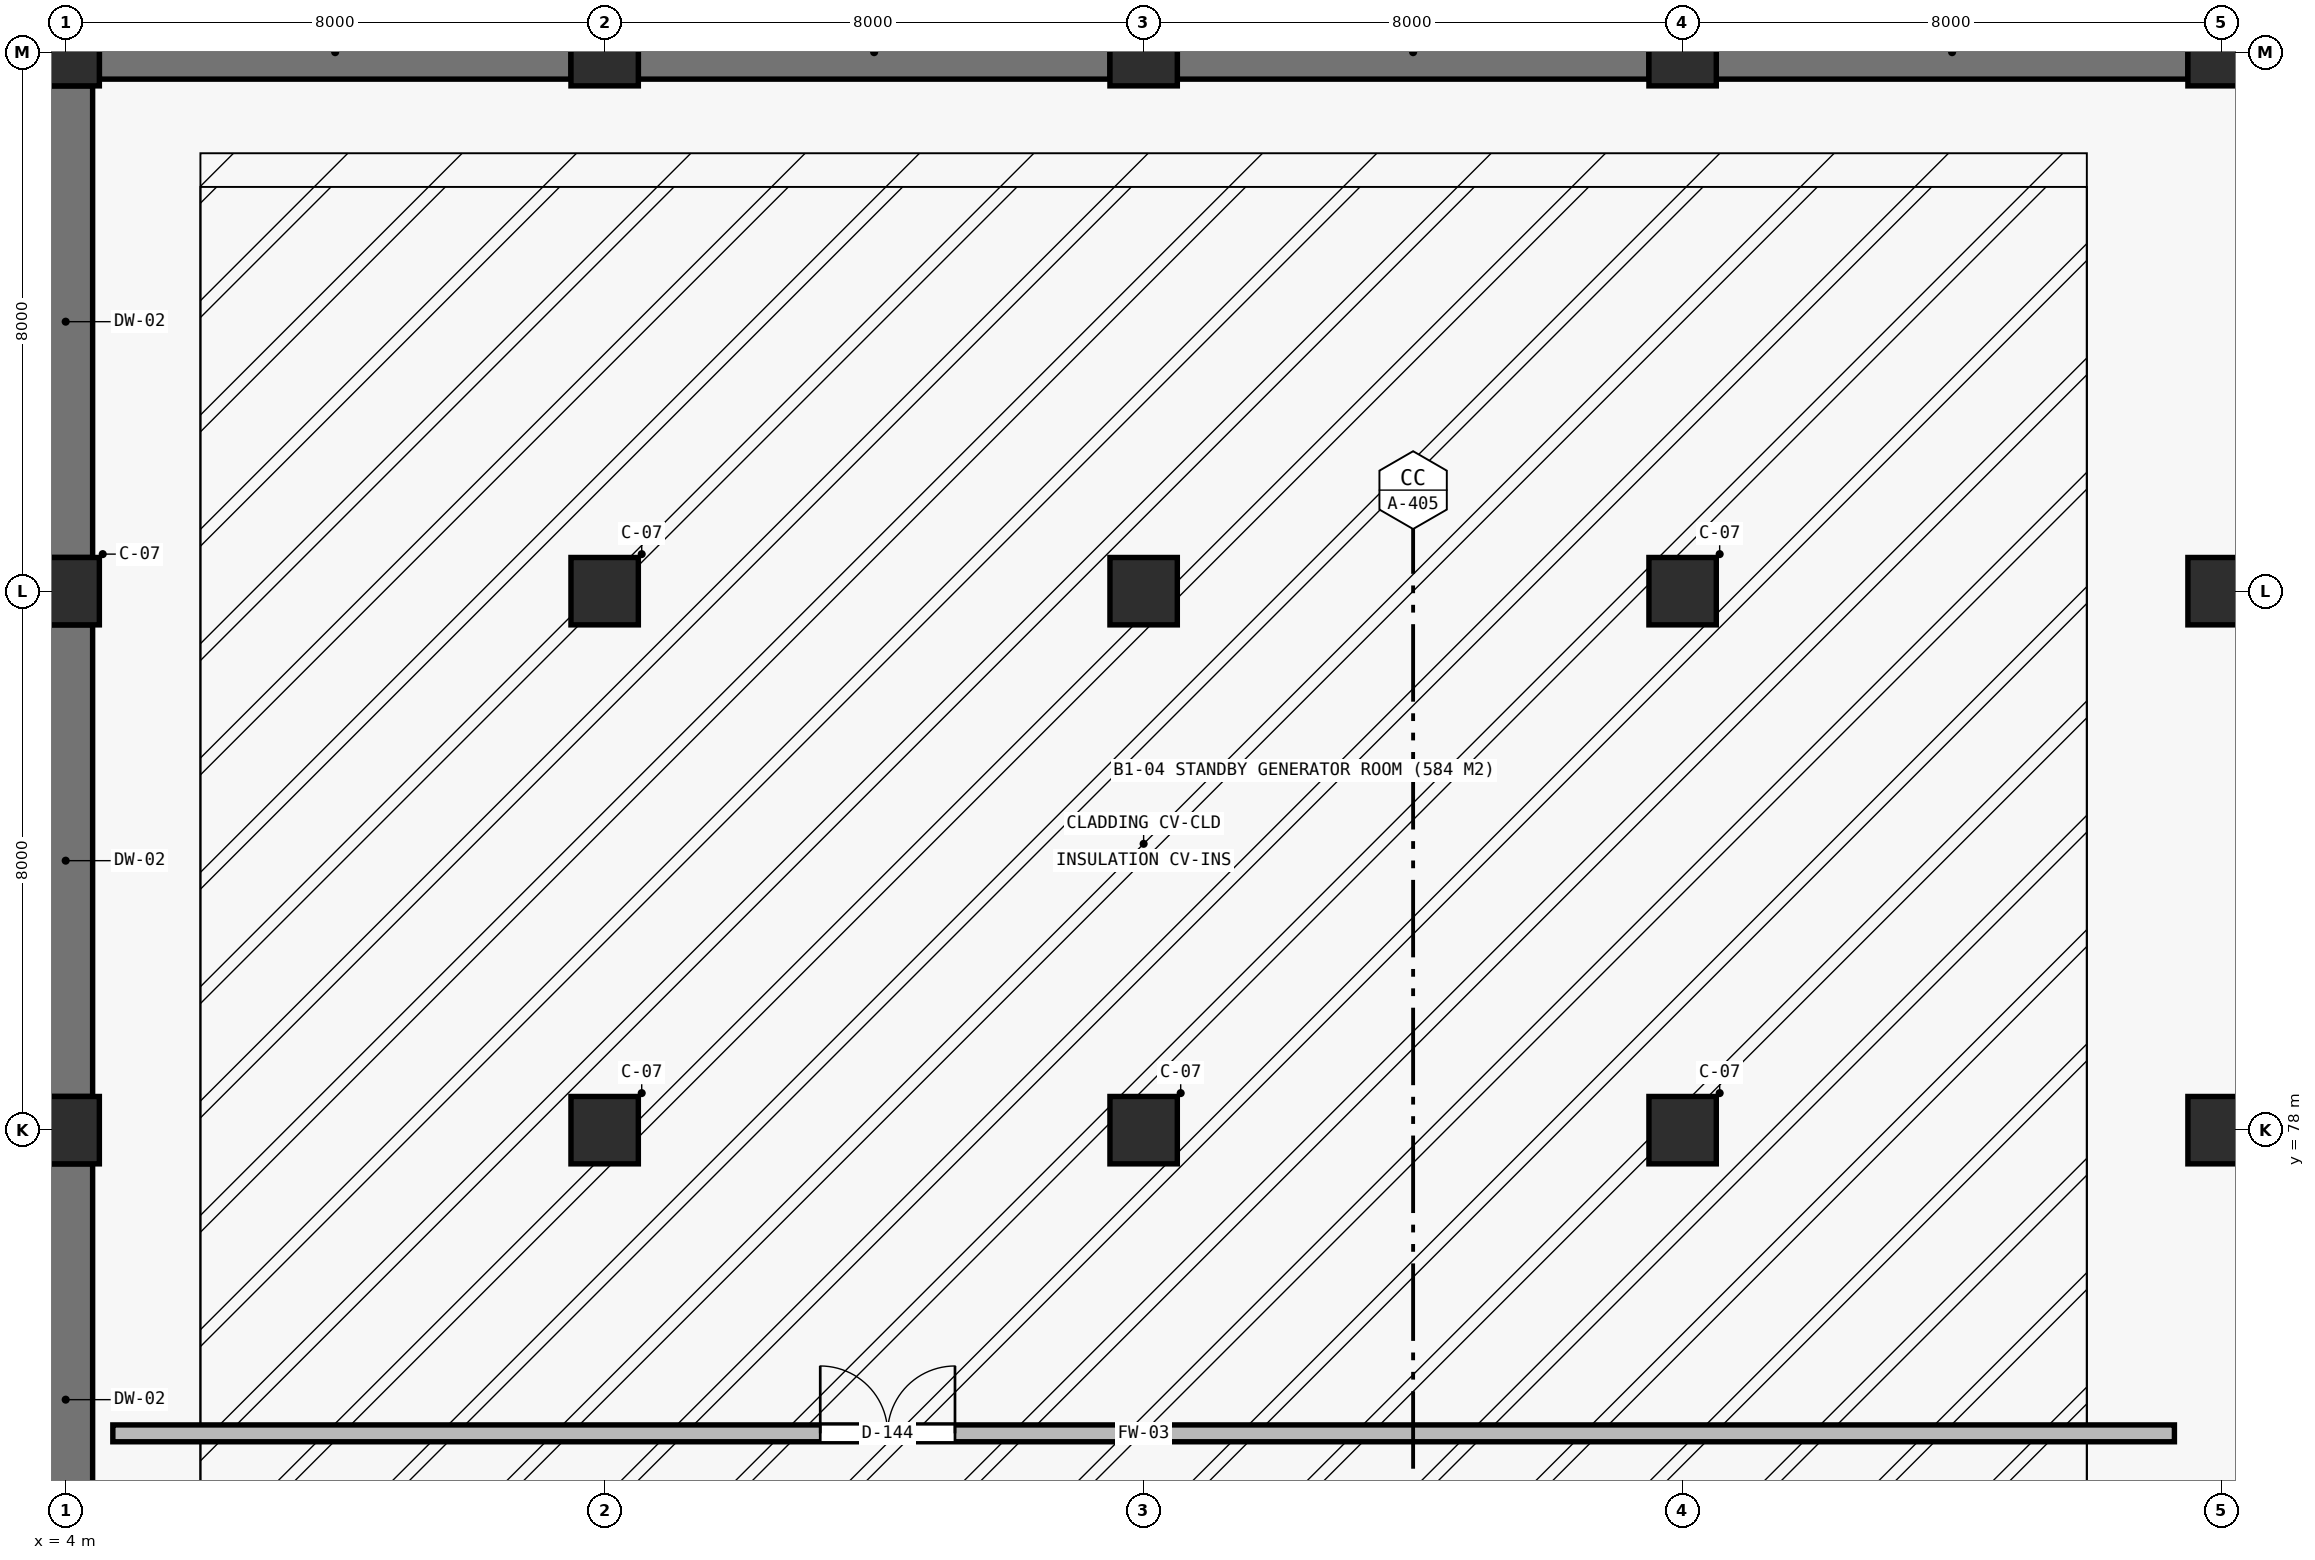
"""IFC4 building model, lengths in metres.
Left out: names, types, materials, properties, quantities, classifications, styles, units other than length and angle.
Written with IfcOpenShell. Run it as: python <this file> out.ifc"""

import sys

from ifc_helpers import new_model, si_unit, direction, frame, frame_2d, origin, origin_2d, place, context, subcontext, project, spatial, rectangle, extrude, element, fill, save


model = new_model("IFC4")
c1 = context("Model", 3, precision=1e-05, world=origin(), true_north=direction((0.0, 1.0)))
c2 = subcontext(c1, "Body", "Model", "MODEL_VIEW")
j1 = project(units=[si_unit("LENGTHUNIT", "METRE"), si_unit("PLANEANGLEUNIT", "RADIAN")], contexts=[c1])
p1 = place(None, origin())
s1 = spatial("IfcSite", under=j1, at=p1, CompositionType="ELEMENT")
p2 = place(p1, origin())
s2 = spatial("IfcBuilding", under=s1, at=p2, CompositionType="ELEMENT")
p3 = place(p2, frame((0.0, 0.0, -6.3)))
s3 = spatial("IfcBuildingStorey", under=s2, at=p3, CompositionType="ELEMENT", Elevation=-6.3)
for number, where, z_axis, x_axis in (
    (1, (4.0, 78.0, 0.0), (0.0, 0.0, 1.0), (1.0, 0.0, 0.0)),
    (2, (4.0, 86.0, 0.0), (0.0, 0.0, 1.0), (1.0, 0.0, 0.0)),
    (3, (4.0, 94.0, 0.0), (0.0, 0.0, 1.0), (1.0, 0.0, 0.0)),
    (4, (12.0, 78.0, 0.0), (0.0, 0.0, 1.0), (1.0, 0.0, 0.0)),
    (5, (12.0, 86.0, 0.0), (0.0, 0.0, 1.0), (1.0, 0.0, 0.0)),
    (6, (12.0, 94.0, 0.0), (0.0, 0.0, 1.0), (1.0, 0.0, 0.0)),
    (7, (20.0, 78.0, 0.0), (0.0, 0.0, 1.0), (1.0, 0.0, 0.0)),
    (8, (20.0, 86.0, 0.0), (0.0, 0.0, 1.0), (1.0, 0.0, 0.0)),
    (9, (20.0, 94.0, 0.0), (0.0, 0.0, 1.0), (1.0, 0.0, 0.0)),
    (10, (28.0, 78.0, 0.0), (0.0, 0.0, 1.0), (1.0, 0.0, 0.0)),
    (11, (28.0, 86.0, 0.0), (0.0, 0.0, 1.0), (1.0, 0.0, 0.0)),
    (12, (28.0, 94.0, 0.0), (0.0, 0.0, 1.0), (1.0, 0.0, 0.0)),
    (13, (36.0, 78.0, 0.0), (0.0, 0.0, 1.0), (1.0, 0.0, 0.0)),
    (14, (36.0, 86.0, 0.0), (0.0, 0.0, 1.0), (1.0, 0.0, 0.0)),
    (15, (36.0, 94.0, 0.0), (0.0, 0.0, 1.0), (1.0, 0.0, 0.0)),
):
    element("IfcColumn", number, at=place(p3, frame(where, z_axis=z_axis, x_axis=x_axis)), inside=s3, PredefinedType="COLUMN", context=c2, shape_type="SweptSolid", body=[
        extrude(rectangle(XDim=1.0, YDim=1.0, at=origin_2d()), origin(), (0.0, 0.0, 1.0), 5.85),
    ])
for number, where, z_axis, x_axis in (
    (16, (35.5, 94.0, 0.0), (0.0, 0.0, 1.0), (-1.0, 0.0, 0.0)),
    (17, (27.5, 94.0, 0.0), (0.0, 0.0, 1.0), (-1.0, 0.0, 0.0)),
    (18, (19.5, 94.0, 0.0), (0.0, 0.0, 1.0), (-1.0, 0.0, 0.0)),
    (19, (11.5, 94.0, 0.0), (0.0, 0.0, 1.0), (-1.0, 0.0, 0.0)),
    (20, (4.0, 93.5, 0.0), (0.0, 0.0, 1.0), (0.0, -1.0, 0.0)),
    (21, (4.0, 85.5, 0.0), (0.0, 0.0, 1.0), (0.0, -1.0, 0.0)),
    (22, (4.0, 77.5, 0.0), (0.0, 0.0, 1.0), (0.0, -1.0, 0.0)),
):
    element("IfcWall", number, at=place(p3, frame(where, z_axis=z_axis, x_axis=x_axis)), inside=s3, PredefinedType="USERDEFINED", context=c2, shape_type="SweptSolid", body=[
        extrude(rectangle(XDim=7.0, YDim=0.8, at=frame_2d((3.5, 0.0))), origin(), (0.0, 0.0, 1.0), 5.85),
    ])
p4 = place(p3, frame((4.7, 73.5, 0.0), z_axis=(0.0, 0.0, 1.0), x_axis=(1.0, 0.0, 0.0)))
e23 = element("IfcWall", 23, at=p4, inside=s3, PredefinedType="SOLIDWALL", context=c2, shape_type="SweptSolid", body=[
    extrude(rectangle(XDim=30.6, YDim=0.25, at=frame_2d((15.3, 0.0))), origin(), (0.0, 0.0, 1.0), 5.85),
])
p5 = place(p4, frame((10.5, 0.0, 0.0)))
e24 = element("IfcOpeningElement", 24, at=p5, cuts=e23, PredefinedType="OPENING", context=c2, shape_type="SweptSolid", body=[
    extrude(rectangle(XDim=2.0, YDim=2.3, at=frame_2d((1.0, 1.15))), frame((0.0, 0.135, 0.0), z_axis=(0.0, -1.0, 0.0), x_axis=(1.0, 0.0, 0.0)), (0.0, 0.0, 1.0), 0.27),
])
p6 = place(p5, origin())
e25 = element("IfcDoor", 25, at=p6, inside=s3, OperationType="DOUBLE_DOOR_SINGLE_SWING", PredefinedType="DOOR", context=c2, shape_type="SweptSolid", body=[
    extrude(rectangle(XDim=2.0, YDim=2.3, at=frame_2d((1.0, 1.15))), frame((0.0, 0.025, 0.0), z_axis=(0.0, -1.0, 0.0), x_axis=(1.0, 0.0, 0.0)), (0.0, 0.0, 1.0), 0.05),
])
fill(e24, e25)
save(model, sys.argv[1])
